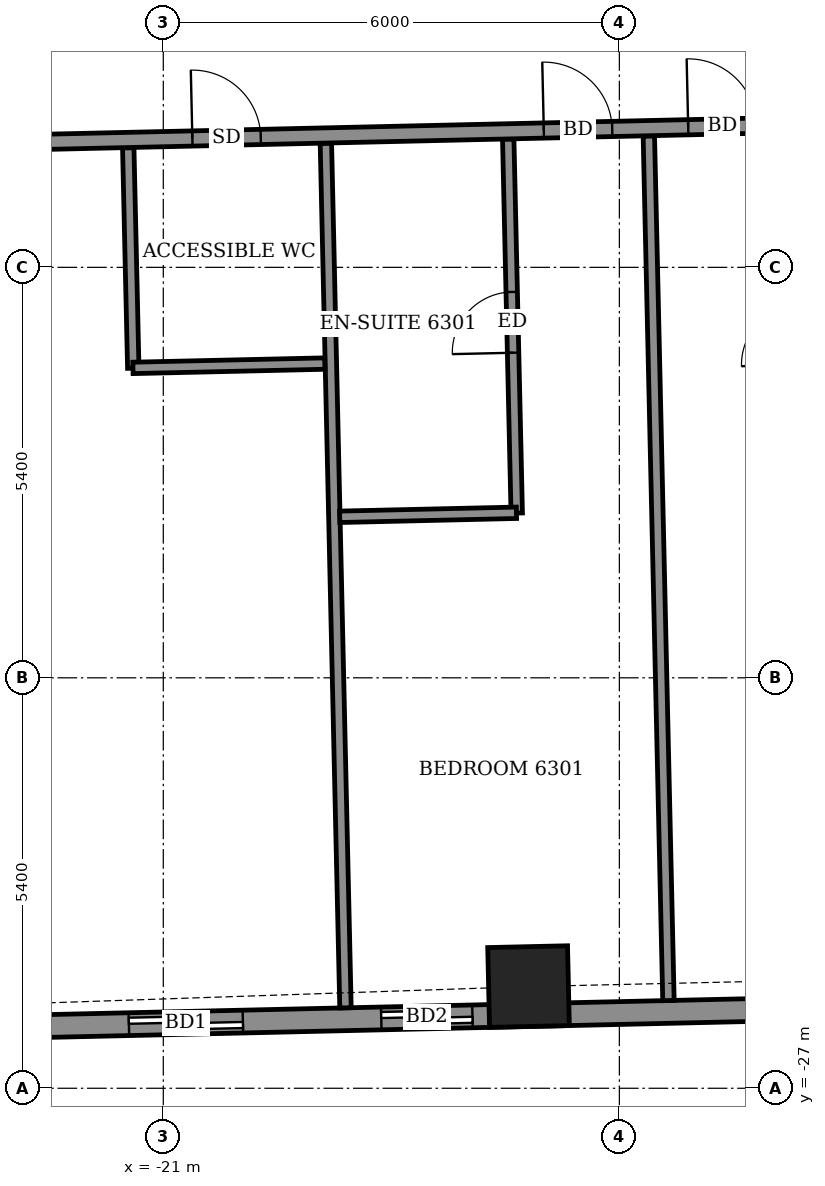
"""IFC4 building model, lengths in metres.
Left out: names, types, materials, properties, quantities, classifications, styles, units other than length and angle.
Written with IfcOpenShell. Run it as: python <this file> out.ifc"""

import sys

from ifc_helpers import new_model, si_unit, direction, frame, frame_2d, origin, origin_2d, place, context, subcontext, project, spatial, rectangle, extrude, element, fill, save


model = new_model("IFC4")
c1 = context("Model", 3, precision=1e-05, world=origin(), true_north=direction((0.0, 1.0)))
c2 = subcontext(c1, "Body", "Model", "MODEL_VIEW")
j1 = project(units=[si_unit("LENGTHUNIT", "METRE"), si_unit("PLANEANGLEUNIT", "RADIAN")], contexts=[c1])
p1 = place(None, origin())
s1 = spatial("IfcSite", under=j1, at=p1, CompositionType="ELEMENT")
p2 = place(p1, origin())
s2 = spatial("IfcBuilding", under=s1, at=p2, CompositionType="ELEMENT")
p3 = place(p2, frame((0.0, 0.0, 249.1)))
s3 = spatial("IfcBuildingStorey", under=s2, at=p3, CompositionType="ELEMENT", Elevation=249.1)
p4 = place(p3, frame((-16.195, -25.662, -0.55), z_axis=(0.0, 0.0, 1.0), x_axis=(0.999743095343, 0.022665906441, 0.0)))
e1 = element("IfcColumn", 1, at=p4, inside=s3, PredefinedType="COLUMN", context=c2, shape_type="SweptSolid", body=[
    extrude(rectangle(XDim=1.05, YDim=1.05, at=origin_2d()), origin(), (0.0, 0.0, 1.0), 3.6),
])
p5 = place(p3, frame((-23.403, -26.201, 0.0), z_axis=(0.0, 0.0, 1.0), x_axis=(0.999742770494, 0.022680230258, 0.0)))
e2 = element("IfcWall", 2, at=p5, inside=s3, PredefinedType="SOLIDWALL", context=c2, shape_type="SweptSolid", body=[
    extrude(rectangle(XDim=43.908, YDim=0.3, at=frame_2d((21.954, 0.0))), origin(), (0.0, 0.0, 1.0), 2.55),
])
p6 = place(p5, frame((1.951, 0.0, 0.0)))
e3 = element("IfcOpeningElement", 3, at=p6, cuts=e2, PredefinedType="OPENING", context=c2, shape_type="SweptSolid", body=[
    extrude(rectangle(XDim=1.5, YDim=2.4, at=frame_2d((0.75, 1.2))), frame((0.0, 0.16, 0.0), z_axis=(0.0, -1.0, 0.0), x_axis=(1.0, 0.0, 0.0)), (0.0, 0.0, 1.0), 0.32),
])
p7 = place(p5, frame((5.272, 0.0, 0.0)))
e4 = element("IfcOpeningElement", 4, at=p7, cuts=e2, PredefinedType="OPENING", context=c2, shape_type="SweptSolid", body=[
    extrude(rectangle(XDim=1.2, YDim=2.4, at=frame_2d((0.6, 1.2))), frame((0.0, 0.16, 0.0), z_axis=(0.0, -1.0, 0.0), x_axis=(1.0, 0.0, 0.0)), (0.0, 0.0, 1.0), 0.32),
])
p8 = place(p5, frame((10.475, 0.0, 0.0)))
e5 = element("IfcOpeningElement", 5, at=p8, cuts=e2, PredefinedType="OPENING", context=c2, shape_type="SweptSolid", body=[
    extrude(rectangle(XDim=1.5, YDim=2.4, at=frame_2d((0.75, 1.2))), frame((0.0, 0.16, 0.0), z_axis=(0.0, -1.0, 0.0), x_axis=(1.0, 0.0, 0.0)), (0.0, 0.0, 1.0), 0.32),
])
p9 = place(p5, frame((15.53, 0.0, 0.0)))
e6 = element("IfcOpeningElement", 6, at=p9, cuts=e2, PredefinedType="OPENING", context=c2, shape_type="SweptSolid", body=[
    extrude(rectangle(XDim=1.5, YDim=2.4, at=frame_2d((0.75, 1.2))), frame((0.0, 0.16, 0.0), z_axis=(0.0, -1.0, 0.0), x_axis=(1.0, 0.0, 0.0)), (0.0, 0.0, 1.0), 0.32),
])
p10 = place(p5, frame((18.939, 0.0, 0.0)))
e7 = element("IfcOpeningElement", 7, at=p10, cuts=e2, PredefinedType="OPENING", context=c2, shape_type="SweptSolid", body=[
    extrude(rectangle(XDim=1.5, YDim=2.4, at=frame_2d((0.75, 1.2))), frame((0.0, 0.16, 0.0), z_axis=(0.0, -1.0, 0.0), x_axis=(1.0, 0.0, 0.0)), (0.0, 0.0, 1.0), 0.32),
])
p11 = place(p5, frame((23.489, 0.0, 0.0)))
e8 = element("IfcOpeningElement", 8, at=p11, cuts=e2, PredefinedType="OPENING", context=c2, shape_type="SweptSolid", body=[
    extrude(rectangle(XDim=1.5, YDim=2.4, at=frame_2d((0.75, 1.2))), frame((0.0, 0.16, 0.0), z_axis=(0.0, -1.0, 0.0), x_axis=(1.0, 0.0, 0.0)), (0.0, 0.0, 1.0), 0.32),
])
p12 = place(p5, frame((26.898, 0.0, 0.0)))
e9 = element("IfcOpeningElement", 9, at=p12, cuts=e2, PredefinedType="OPENING", context=c2, shape_type="SweptSolid", body=[
    extrude(rectangle(XDim=1.5, YDim=2.4, at=frame_2d((0.75, 1.2))), frame((0.0, 0.16, 0.0), z_axis=(0.0, -1.0, 0.0), x_axis=(1.0, 0.0, 0.0)), (0.0, 0.0, 1.0), 0.32),
])
p13 = place(p5, frame((32.05, 0.0, 0.0)))
e10 = element("IfcOpeningElement", 10, at=p13, cuts=e2, PredefinedType="OPENING", context=c2, shape_type="SweptSolid", body=[
    extrude(rectangle(XDim=1.5, YDim=2.4, at=frame_2d((0.75, 1.2))), frame((0.0, 0.16, 0.0), z_axis=(0.0, -1.0, 0.0), x_axis=(1.0, 0.0, 0.0)), (0.0, 0.0, 1.0), 0.32),
])
p14 = place(p5, frame((37.382, 0.0, 0.0)))
e11 = element("IfcOpeningElement", 11, at=p14, cuts=e2, PredefinedType="OPENING", context=c2, shape_type="SweptSolid", body=[
    extrude(rectangle(XDim=1.5, YDim=2.4, at=frame_2d((0.75, 1.2))), frame((0.0, 0.16, 0.0), z_axis=(0.0, -1.0, 0.0), x_axis=(1.0, 0.0, 0.0)), (0.0, 0.0, 1.0), 0.32),
])
p15 = place(p5, frame((40.057, 0.0, 0.9)))
e12 = element("IfcOpeningElement", 12, at=p15, cuts=e2, PredefinedType="OPENING", context=c2, shape_type="SweptSolid", body=[
    extrude(rectangle(XDim=2.4, YDim=1.5, at=frame_2d((1.2, 0.75))), frame((0.0, 0.16, 0.0), z_axis=(0.0, -1.0, 0.0), x_axis=(1.0, 0.0, 0.0)), (0.0, 0.0, 1.0), 0.32),
])
p16 = place(p3, frame((-18.603, -25.942, 0.0), z_axis=(0.0, 0.0, 1.0), x_axis=(-0.022684842063, 0.99974266586, 0.0)))
e13 = element("IfcWall", 13, at=p16, inside=s3, PredefinedType="PARTITIONING", context=c2, shape_type="SweptSolid", body=[
    extrude(rectangle(XDim=11.376, YDim=0.15, at=frame_2d((5.688, 0.0))), origin(), (0.0, 0.0, 1.0), 2.55),
])
p17 = place(p3, frame((-14.354, -25.846, 0.0), z_axis=(0.0, 0.0, 1.0), x_axis=(-0.022684355347, 0.999742676904, 0.0)))
e14 = element("IfcWall", 14, at=p17, inside=s3, PredefinedType="PARTITIONING", context=c2, shape_type="SweptSolid", body=[
    extrude(rectangle(XDim=11.376, YDim=0.15, at=frame_2d((5.688, 0.0))), origin(), (0.0, 0.0, 1.0), 2.5),
])
p18 = place(p3, frame((-16.35, -19.433, 0.0), z_axis=(0.0, 0.0, 1.0), x_axis=(-0.022724786614, 0.999741758692, 0.0)))
e15 = element("IfcWall", 15, at=p18, inside=s3, PredefinedType="PARTITIONING", context=c2, shape_type="SweptSolid", body=[
    extrude(rectangle(XDim=4.92, YDim=0.15, at=frame_2d((2.46, 0.0))), origin(), (0.0, 0.0, 1.0), 3.05),
])
p19 = place(p18, frame((2.11, 0.0, 0.0)))
e16 = element("IfcOpeningElement", 16, at=p19, cuts=e15, PredefinedType="OPENING", context=c2, shape_type="SweptSolid", body=[
    extrude(rectangle(XDim=0.8, YDim=2.1, at=frame_2d((0.4, 1.05))), frame((0.0, 0.085, 0.0), z_axis=(0.0, -1.0, 0.0), x_axis=(1.0, 0.0, 0.0)), (0.0, 0.0, 1.0), 0.17),
])
p20 = place(p3, frame((-18.679, -19.482, 0.0), z_axis=(0.0, 0.0, 1.0), x_axis=(0.999740478815, 0.022781023197, 0.0)))
e17 = element("IfcWall", 17, at=p20, inside=s3, PredefinedType="PARTITIONING", context=c2, shape_type="SweptSolid", body=[
    extrude(rectangle(XDim=2.325, YDim=0.15, at=frame_2d((1.163, 0.0))), origin(), (0.0, 0.0, 1.0), 3.05),
])
p21 = place(p3, frame((-21.395, -17.527, 0.0), z_axis=(0.0, 0.0, 1.0), x_axis=(-0.022730967319, 0.999741618182, 0.0)))
e18 = element("IfcWall", 18, at=p21, inside=s3, PredefinedType="PARTITIONING", context=c2, shape_type="SweptSolid", body=[
    extrude(rectangle(XDim=2.9, YDim=0.15, at=frame_2d((1.45, 0.0))), origin(), (0.0, 0.0, 1.0), 3.05),
])
p22 = place(p3, frame((-21.399, -17.523, 0.0), z_axis=(0.0, 0.0, 1.0), x_axis=(0.9997461113, 0.022532486354, 0.0)))
e19 = element("IfcWall", 19, at=p22, inside=s3, PredefinedType="PARTITIONING", context=c2, shape_type="SweptSolid", body=[
    extrude(rectangle(XDim=2.525, YDim=0.15, at=frame_2d((1.262, 0.0))), origin(), (0.0, 0.0, 1.0), 3.05),
])
p23 = place(p3, frame((-27.016, -14.65, 0.0), z_axis=(0.0, 0.0, 1.0), x_axis=(0.999742874861, 0.022675629315, 0.0)))
e20 = element("IfcWall", 20, at=p23, inside=s3, PredefinedType="PARTITIONING", context=c2, shape_type="SweptSolid", body=[
    extrude(rectangle(XDim=50.883, YDim=0.2, at=frame_2d((25.442, 0.0))), origin(), (0.0, 0.0, 1.0), 3.05),
])
p24 = place(p23, frame((1.575, 0.0, 0.0)))
e21 = element("IfcOpeningElement", 21, at=p24, cuts=e20, PredefinedType="OPENING", context=c2, shape_type="SweptSolid", body=[
    extrude(rectangle(XDim=1.0, YDim=2.1, at=frame_2d((0.5, 1.05))), frame((0.0, 0.11, 0.0), z_axis=(0.0, -1.0, 0.0), x_axis=(1.0, 0.0, 0.0)), (0.0, 0.0, 1.0), 0.22),
])
p25 = place(p23, frame((6.4, 0.0, 0.0)))
e22 = element("IfcOpeningElement", 22, at=p25, cuts=e20, PredefinedType="OPENING", context=c2, shape_type="SweptSolid", body=[
    extrude(rectangle(XDim=0.9, YDim=2.1, at=frame_2d((0.45, 1.05))), frame((0.0, 0.11, 0.0), z_axis=(0.0, -1.0, 0.0), x_axis=(1.0, 0.0, 0.0)), (0.0, 0.0, 1.0), 0.22),
])
p26 = place(p23, frame((11.025, 0.0, 0.0)))
e23 = element("IfcOpeningElement", 23, at=p26, cuts=e20, PredefinedType="OPENING", context=c2, shape_type="SweptSolid", body=[
    extrude(rectangle(XDim=0.9, YDim=2.1, at=frame_2d((0.45, 1.05))), frame((0.0, 0.11, 0.0), z_axis=(0.0, -1.0, 0.0), x_axis=(1.0, 0.0, 0.0)), (0.0, 0.0, 1.0), 0.22),
])
p27 = place(p23, frame((12.925, 0.0, 0.0)))
e24 = element("IfcOpeningElement", 24, at=p27, cuts=e20, PredefinedType="OPENING", context=c2, shape_type="SweptSolid", body=[
    extrude(rectangle(XDim=0.9, YDim=2.1, at=frame_2d((0.45, 1.05))), frame((0.0, 0.11, 0.0), z_axis=(0.0, -1.0, 0.0), x_axis=(1.0, 0.0, 0.0)), (0.0, 0.0, 1.0), 0.22),
])
p28 = place(p23, frame((19.65, 0.0, 0.0)))
e25 = element("IfcOpeningElement", 25, at=p28, cuts=e20, PredefinedType="OPENING", context=c2, shape_type="SweptSolid", body=[
    extrude(rectangle(XDim=0.9, YDim=2.1, at=frame_2d((0.45, 1.05))), frame((0.0, 0.11, 0.0), z_axis=(0.0, -1.0, 0.0), x_axis=(1.0, 0.0, 0.0)), (0.0, 0.0, 1.0), 0.22),
])
p29 = place(p23, frame((21.575, 0.0, 0.0)))
e26 = element("IfcOpeningElement", 26, at=p29, cuts=e20, PredefinedType="OPENING", context=c2, shape_type="SweptSolid", body=[
    extrude(rectangle(XDim=0.9, YDim=2.1, at=frame_2d((0.45, 1.05))), frame((0.0, 0.11, 0.0), z_axis=(0.0, -1.0, 0.0), x_axis=(1.0, 0.0, 0.0)), (0.0, 0.0, 1.0), 0.22),
])
p30 = place(p23, frame((28.25, 0.0, 0.0)))
e27 = element("IfcOpeningElement", 27, at=p30, cuts=e20, PredefinedType="OPENING", context=c2, shape_type="SweptSolid", body=[
    extrude(rectangle(XDim=0.9, YDim=2.1, at=frame_2d((0.45, 1.05))), frame((0.0, 0.11, 0.0), z_axis=(0.0, -1.0, 0.0), x_axis=(1.0, 0.0, 0.0)), (0.0, 0.0, 1.0), 0.22),
])
p31 = place(p23, frame((30.125, 0.0, 0.0)))
e28 = element("IfcOpeningElement", 28, at=p31, cuts=e20, PredefinedType="OPENING", context=c2, shape_type="SweptSolid", body=[
    extrude(rectangle(XDim=0.9, YDim=2.1, at=frame_2d((0.45, 1.05))), frame((0.0, 0.11, 0.0), z_axis=(0.0, -1.0, 0.0), x_axis=(1.0, 0.0, 0.0)), (0.0, 0.0, 1.0), 0.22),
])
p32 = place(p23, frame((36.9, 0.0, 0.0)))
e29 = element("IfcOpeningElement", 29, at=p32, cuts=e20, PredefinedType="OPENING", context=c2, shape_type="SweptSolid", body=[
    extrude(rectangle(XDim=0.9, YDim=2.1, at=frame_2d((0.45, 1.05))), frame((0.0, 0.11, 0.0), z_axis=(0.0, -1.0, 0.0), x_axis=(1.0, 0.0, 0.0)), (0.0, 0.0, 1.0), 0.22),
])
p33 = place(p23, frame((38.85, 0.0, 0.0)))
e30 = element("IfcOpeningElement", 30, at=p33, cuts=e20, PredefinedType="OPENING", context=c2, shape_type="SweptSolid", body=[
    extrude(rectangle(XDim=0.9, YDim=2.1, at=frame_2d((0.45, 1.05))), frame((0.0, 0.11, 0.0), z_axis=(0.0, -1.0, 0.0), x_axis=(1.0, 0.0, 0.0)), (0.0, 0.0, 1.0), 0.22),
])
p34 = place(p23, frame((48.629, 0.0, 0.0)))
e31 = element("IfcOpeningElement", 31, at=p34, cuts=e20, PredefinedType="OPENING", context=c2, shape_type="SweptSolid", body=[
    extrude(rectangle(XDim=1.0, YDim=2.1, at=frame_2d((0.5, 1.05))), frame((0.0, 0.11, 0.0), z_axis=(0.0, -1.0, 0.0), x_axis=(1.0, 0.0, 0.0)), (0.0, 0.0, 1.0), 0.22),
])
p35 = place(p23, frame((43.6, 0.0, 0.0)))
e32 = element("IfcOpeningElement", 32, at=p35, cuts=e20, PredefinedType="OPENING", context=c2, shape_type="SweptSolid", body=[
    extrude(rectangle(XDim=0.9, YDim=2.1, at=frame_2d((0.45, 1.05))), frame((0.0, 0.11, 0.0), z_axis=(0.0, -1.0, 0.0), x_axis=(1.0, 0.0, 0.0)), (0.0, 0.0, 1.0), 0.22),
])
p36 = place(p6, origin())
e33 = element("IfcDoor", 33, at=p36, inside=s3, OperationType="SLIDING_TO_LEFT", PredefinedType="DOOR", context=c2, shape_type="SweptSolid", body=[
    extrude(rectangle(XDim=1.5, YDim=2.4, at=frame_2d((0.75, 1.2))), frame((0.0, 0.025, 0.0), z_axis=(0.0, -1.0, 0.0), x_axis=(1.0, 0.0, 0.0)), (0.0, 0.0, 1.0), 0.05),
])
fill(e3, e33)
p37 = place(p7, origin())
e34 = element("IfcDoor", 34, at=p37, inside=s3, OperationType="SLIDING_TO_LEFT", PredefinedType="DOOR", context=c2, shape_type="SweptSolid", body=[
    extrude(rectangle(XDim=1.2, YDim=2.4, at=frame_2d((0.6, 1.2))), frame((0.0, 0.025, 0.0), z_axis=(0.0, -1.0, 0.0), x_axis=(1.0, 0.0, 0.0)), (0.0, 0.0, 1.0), 0.05),
])
fill(e4, e34)
p38 = place(p25, origin())
e35 = element("IfcDoor", 35, at=p38, inside=s3, OperationType="SINGLE_SWING_LEFT", PredefinedType="DOOR", context=c2, shape_type="SweptSolid", body=[
    extrude(rectangle(XDim=0.9, YDim=2.1, at=frame_2d((0.45, 1.05))), frame((0.0, 0.025, 0.0), z_axis=(0.0, -1.0, 0.0), x_axis=(1.0, 0.0, 0.0)), (0.0, 0.0, 1.0), 0.05),
])
fill(e22, e35)
p39 = place(p26, origin())
e36 = element("IfcDoor", 36, at=p39, inside=s3, OperationType="SINGLE_SWING_LEFT", PredefinedType="DOOR", context=c2, shape_type="SweptSolid", body=[
    extrude(rectangle(XDim=0.9, YDim=2.1, at=frame_2d((0.45, 1.05))), frame((0.0, 0.025, 0.0), z_axis=(0.0, -1.0, 0.0), x_axis=(1.0, 0.0, 0.0)), (0.0, 0.0, 1.0), 0.05),
])
fill(e23, e36)
p40 = place(p19, origin())
e37 = element("IfcDoor", 37, at=p40, inside=s3, OperationType="SINGLE_SWING_LEFT", PredefinedType="DOOR", context=c2, shape_type="SweptSolid", body=[
    extrude(rectangle(XDim=0.8, YDim=2.1, at=frame_2d((0.4, 1.05))), frame((0.0, 0.025, 0.0), z_axis=(0.0, -1.0, 0.0), x_axis=(1.0, 0.0, 0.0)), (0.0, 0.0, 1.0), 0.05),
])
fill(e16, e37)
p41 = place(p27, origin())
e38 = element("IfcDoor", 38, at=p41, inside=s3, OperationType="SINGLE_SWING_RIGHT", PredefinedType="DOOR", context=c2, shape_type="SweptSolid", body=[
    extrude(rectangle(XDim=0.9, YDim=2.1, at=frame_2d((0.45, 1.05))), frame((0.0, 0.025, 0.0), z_axis=(0.0, -1.0, 0.0), x_axis=(1.0, 0.0, 0.0)), (0.0, 0.0, 1.0), 0.05),
])
fill(e24, e38)
save(model, sys.argv[1])
